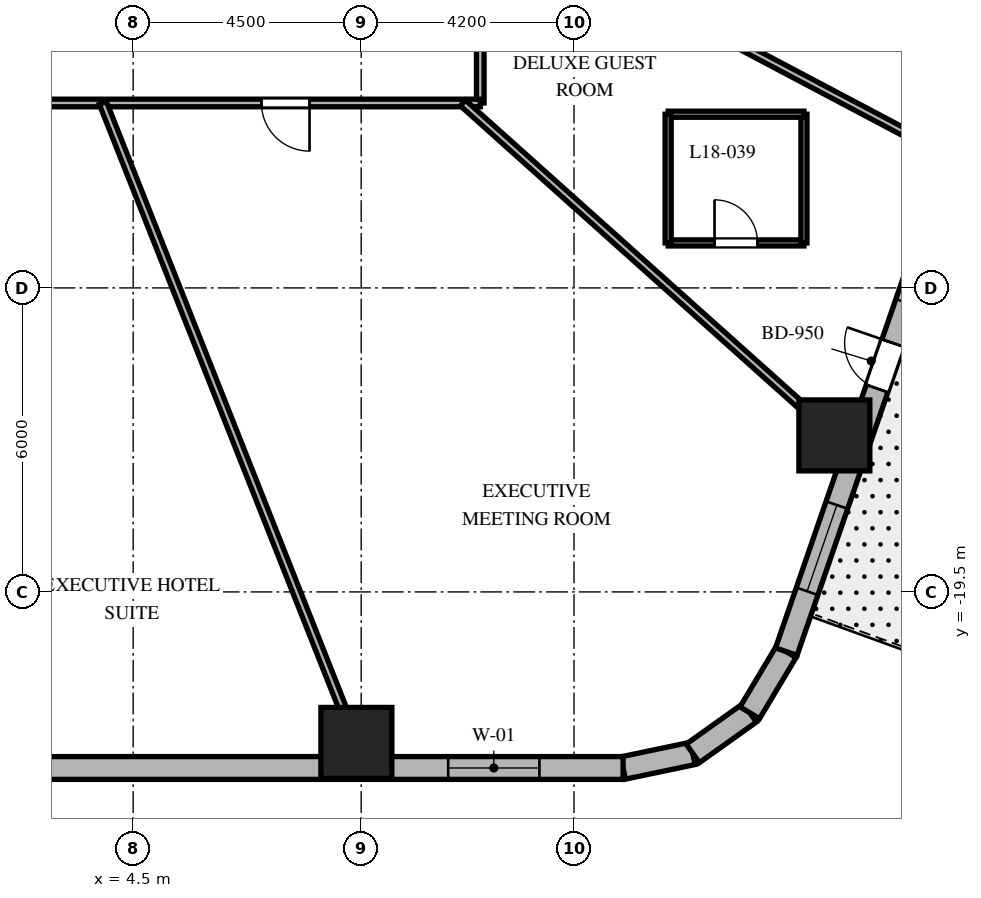
"""IFC4 building model, lengths in metres.
Left out: names, types, materials, properties, quantities, classifications, styles, units other than length and angle.
Written with IfcOpenShell. Run it as: python <this file> out.ifc"""

import sys

from ifc_helpers import new_model, si_unit, direction, frame, frame_2d, origin, origin_2d, place, context, subcontext, project, spatial, rectangle, extrude, element, fill, save


model = new_model("IFC4")
c1 = context("Model", 3, precision=1e-05, world=origin(), true_north=direction((0.0, 1.0)))
c2 = subcontext(c1, "Body", "Model", "MODEL_VIEW")
j1 = project(units=[si_unit("LENGTHUNIT", "METRE"), si_unit("PLANEANGLEUNIT", "RADIAN")], contexts=[c1])
p1 = place(None, origin())
s1 = spatial("IfcSite", under=j1, at=p1, CompositionType="ELEMENT")
p2 = place(p1, origin())
s2 = spatial("IfcBuilding", under=s1, at=p2, CompositionType="ELEMENT")
p3 = place(p2, frame((0.0, 0.0, 78.6)))
s3 = spatial("IfcBuildingStorey", under=s2, at=p3, CompositionType="ELEMENT", Elevation=78.6)
for number, where, z_axis, x_axis in (
    (1, (8.905, -22.48, 0.0), (0.0, 0.0, 1.0), (1.0, 0.0, 0.0)),
    (2, (18.338, -16.411, 0.0), (0.0, 0.0, 1.0), (1.0, 0.0, 0.0)),
):
    element("IfcColumn", number, at=place(p3, frame(where, z_axis=z_axis, x_axis=x_axis)), inside=s3, PredefinedType="COLUMN", context=c2, shape_type="SweptSolid", body=[
        extrude(rectangle(XDim=1.4, YDim=1.4, at=origin_2d()), origin(), (0.0, 0.0, 1.0), 3.7),
    ])
p4 = place(p3, frame((14.168, -22.975, 0.0), z_axis=(0.0, 0.0, 1.0), x_axis=(0.978770371074, 0.204959900243, 0.0)))
e3 = element("IfcWall", 3, at=p4, inside=s3, PredefinedType="SOLIDWALL", context=c2, shape_type="SweptSolid", body=[
    extrude(rectangle(XDim=1.406, YDim=0.45, at=frame_2d((0.703, 0.0))), origin(), (0.0, 0.0, 1.0), 3.4),
])
p5 = place(p3, frame((15.544, -22.687, 0.0), z_axis=(0.0, 0.0, 1.0), x_axis=(0.814210854316, 0.580569276412, 0.0)))
e4 = element("IfcWall", 4, at=p5, inside=s3, PredefinedType="SOLIDWALL", context=c2, shape_type="SweptSolid", body=[
    extrude(rectangle(XDim=1.381, YDim=0.45, at=frame_2d((0.691, 0.0))), origin(), (0.0, 0.0, 1.0), 3.4),
])
p6 = place(p3, frame((16.669, -21.885, 0.0), z_axis=(0.0, 0.0, 1.0), x_axis=(0.512936712947, 0.858426425799, 0.0)))
e5 = element("IfcWall", 5, at=p6, inside=s3, PredefinedType="SOLIDWALL", context=c2, shape_type="SweptSolid", body=[
    extrude(rectangle(XDim=1.406, YDim=0.45, at=frame_2d((0.703, 0.0))), origin(), (0.0, 0.0, 1.0), 3.4),
])
p7 = place(p3, frame((-12.221, -22.975, 0.0), z_axis=(0.0, 0.0, 1.0), x_axis=(1.0, 0.0, 0.0)))
e6 = element("IfcWall", 6, at=p7, inside=s3, PredefinedType="SOLIDWALL", context=c2, shape_type="SweptSolid", body=[
    extrude(rectangle(XDim=26.389, YDim=0.45, at=frame_2d((13.195, 0.0))), origin(), (0.0, 0.0, 1.0), 3.4),
])
p8 = place(p7, frame((1.653, 0.0, 0.8)))
e7 = element("IfcOpeningElement", 7, at=p8, cuts=e6, PredefinedType="OPENING", context=c2, shape_type="SweptSolid", body=[
    extrude(rectangle(XDim=1.8, YDim=1.8, at=frame_2d((0.9, 0.9))), frame((0.0, 0.235, 0.0), z_axis=(0.0, -1.0, 0.0), x_axis=(1.0, 0.0, 0.0)), (0.0, 0.0, 1.0), 0.47),
])
p9 = place(p7, frame((12.296, 0.0, 0.8)))
e8 = element("IfcOpeningElement", 8, at=p9, cuts=e6, PredefinedType="OPENING", context=c2, shape_type="SweptSolid", body=[
    extrude(rectangle(XDim=1.8, YDim=1.8, at=frame_2d((0.9, 0.9))), frame((0.0, 0.235, 0.0), z_axis=(0.0, -1.0, 0.0), x_axis=(1.0, 0.0, 0.0)), (0.0, 0.0, 1.0), 0.47),
])
p10 = place(p7, frame((22.938, 0.0, 0.8)))
e9 = element("IfcOpeningElement", 9, at=p10, cuts=e6, PredefinedType="OPENING", context=c2, shape_type="SweptSolid", body=[
    extrude(rectangle(XDim=1.8, YDim=1.8, at=frame_2d((0.9, 0.9))), frame((0.0, 0.235, 0.0), z_axis=(0.0, -1.0, 0.0), x_axis=(1.0, 0.0, 0.0)), (0.0, 0.0, 1.0), 0.47),
])
p11 = place(p3, frame((17.39, -20.678, 0.0), z_axis=(0.0, 0.0, 1.0), x_axis=(0.326068018294, 0.945346310854, 0.0)))
e10 = element("IfcWall", 10, at=p11, inside=s3, PredefinedType="SOLIDWALL", context=c2, shape_type="SweptSolid", body=[
    extrude(rectangle(XDim=21.793, YDim=0.45, at=frame_2d((10.896, 0.0))), origin(), (0.0, 0.0, 1.0), 3.4),
])
p12 = place(p11, frame((5.493, 0.0, 0.0)))
e11 = element("IfcOpeningElement", 11, at=p12, cuts=e10, PredefinedType="OPENING", context=c2, shape_type="SweptSolid", body=[
    extrude(rectangle(XDim=0.95, YDim=2.15, at=frame_2d((0.475, 1.075))), frame((0.0, 0.235, 0.0), z_axis=(0.0, -1.0, 0.0), x_axis=(1.0, 0.0, 0.0)), (0.0, 0.0, 1.0), 0.47),
])
p13 = place(p11, frame((1.26, 0.0, 0.8)))
e12 = element("IfcOpeningElement", 12, at=p13, cuts=e10, PredefinedType="OPENING", context=c2, shape_type="SweptSolid", body=[
    extrude(rectangle(XDim=1.8, YDim=1.8, at=frame_2d((0.9, 0.9))), frame((0.0, 0.235, 0.0), z_axis=(0.0, -1.0, 0.0), x_axis=(1.0, 0.0, 0.0)), (0.0, 0.0, 1.0), 0.47),
])
p14 = place(p11, frame((7.283, 0.0, 0.8)))
e13 = element("IfcOpeningElement", 13, at=p14, cuts=e10, PredefinedType="OPENING", context=c2, shape_type="SweptSolid", body=[
    extrude(rectangle(XDim=1.8, YDim=1.8, at=frame_2d((0.9, 0.9))), frame((0.0, 0.235, 0.0), z_axis=(0.0, -1.0, 0.0), x_axis=(1.0, 0.0, 0.0)), (0.0, 0.0, 1.0), 0.47),
])
p15 = place(p11, frame((12.736, 0.0, 0.8)))
e14 = element("IfcOpeningElement", 14, at=p15, cuts=e10, PredefinedType="OPENING", context=c2, shape_type="SweptSolid", body=[
    extrude(rectangle(XDim=1.8, YDim=1.8, at=frame_2d((0.9, 0.9))), frame((0.0, 0.235, 0.0), z_axis=(0.0, -1.0, 0.0), x_axis=(1.0, 0.0, 0.0)), (0.0, 0.0, 1.0), 0.47),
])
p16 = place(p11, frame((18.68, 0.0, 0.8)))
e15 = element("IfcOpeningElement", 15, at=p16, cuts=e10, PredefinedType="OPENING", context=c2, shape_type="SweptSolid", body=[
    extrude(rectangle(XDim=1.8, YDim=1.8, at=frame_2d((0.9, 0.9))), frame((0.0, 0.235, 0.0), z_axis=(0.0, -1.0, 0.0), x_axis=(1.0, 0.0, 0.0)), (0.0, 0.0, 1.0), 0.47),
])
p17 = place(p3, frame((11.35, 9.85, 0.0), z_axis=(0.0, 0.0, 1.0), x_axis=(0.0, -1.0, 0.0)))
e16 = element("IfcWall", 16, at=p17, inside=s3, PredefinedType="PARTITIONING", context=c2, shape_type="SweptSolid", body=[
    extrude(rectangle(XDim=19.7, YDim=0.15, at=frame_2d((9.85, 0.0))), origin(), (0.0, 0.0, 1.0), 2.84),
])
p18 = place(p17, frame((4.208, 0.0, 0.0)))
e17 = element("IfcOpeningElement", 17, at=p18, cuts=e16, PredefinedType="OPENING", context=c2, shape_type="SweptSolid", body=[
    extrude(rectangle(XDim=0.95, YDim=2.03, at=frame_2d((0.475, 1.015))), frame((0.0, 0.085, 0.0), z_axis=(0.0, -1.0, 0.0), x_axis=(1.0, 0.0, 0.0)), (0.0, 0.0, 1.0), 0.17),
])
p19 = place(p17, frame((0.97, 0.0, 0.0)))
e18 = element("IfcOpeningElement", 18, at=p19, cuts=e16, PredefinedType="OPENING", context=c2, shape_type="SweptSolid", body=[
    extrude(rectangle(XDim=0.95, YDim=2.03, at=frame_2d((0.475, 1.015))), frame((0.0, 0.085, 0.0), z_axis=(0.0, -1.0, 0.0), x_axis=(1.0, 0.0, 0.0)), (0.0, 0.0, 1.0), 0.17),
])
p20 = place(p17, frame((17.181, 0.0, 0.0)))
e19 = element("IfcOpeningElement", 19, at=p20, cuts=e16, PredefinedType="OPENING", context=c2, shape_type="SweptSolid", body=[
    extrude(rectangle(XDim=0.95, YDim=2.03, at=frame_2d((0.475, 1.015))), frame((0.0, 0.085, 0.0), z_axis=(0.0, -1.0, 0.0), x_axis=(1.0, 0.0, 0.0)), (0.0, 0.0, 1.0), 0.17),
])
p21 = place(p17, frame((13.403, 0.0, 0.0)))
e20 = element("IfcOpeningElement", 20, at=p21, cuts=e16, PredefinedType="OPENING", context=c2, shape_type="SweptSolid", body=[
    extrude(rectangle(XDim=0.95, YDim=2.03, at=frame_2d((0.475, 1.015))), frame((0.0, 0.085, 0.0), z_axis=(0.0, -1.0, 0.0), x_axis=(1.0, 0.0, 0.0)), (0.0, 0.0, 1.0), 0.17),
])
p22 = place(p17, frame((8.838, 0.0, 0.0)))
e21 = element("IfcOpeningElement", 21, at=p22, cuts=e16, PredefinedType="OPENING", context=c2, shape_type="SweptSolid", body=[
    extrude(rectangle(XDim=0.95, YDim=2.03, at=frame_2d((0.475, 1.015))), frame((0.0, 0.085, 0.0), z_axis=(0.0, -1.0, 0.0), x_axis=(1.0, 0.0, 0.0)), (0.0, 0.0, 1.0), 0.17),
])
p23 = place(p3, frame((11.35, -9.85, 0.0), z_axis=(0.0, 0.0, 1.0), x_axis=(-1.0, 0.0, 0.0)))
e22 = element("IfcWall", 22, at=p23, inside=s3, PredefinedType="PARTITIONING", context=c2, shape_type="SweptSolid", body=[
    extrude(rectangle(XDim=22.7, YDim=0.15, at=frame_2d((11.35, 0.0))), origin(), (0.0, 0.0, 1.0), 2.84),
])
p24 = place(p23, frame((18.837, 0.0, 0.0)))
e23 = element("IfcOpeningElement", 23, at=p24, cuts=e22, PredefinedType="OPENING", context=c2, shape_type="SweptSolid", body=[
    extrude(rectangle(XDim=0.9, YDim=2.03, at=frame_2d((0.45, 1.015))), frame((0.0, 0.085, 0.0), z_axis=(0.0, -1.0, 0.0), x_axis=(1.0, 0.0, 0.0)), (0.0, 0.0, 1.0), 0.17),
])
p25 = place(p23, frame((15.532, 0.0, 0.0)))
e24 = element("IfcOpeningElement", 24, at=p25, cuts=e22, PredefinedType="OPENING", context=c2, shape_type="SweptSolid", body=[
    extrude(rectangle(XDim=0.95, YDim=2.03, at=frame_2d((0.475, 1.015))), frame((0.0, 0.085, 0.0), z_axis=(0.0, -1.0, 0.0), x_axis=(1.0, 0.0, 0.0)), (0.0, 0.0, 1.0), 0.17),
])
p26 = place(p23, frame((10.444, 0.0, 0.0)))
e25 = element("IfcOpeningElement", 25, at=p26, cuts=e22, PredefinedType="OPENING", context=c2, shape_type="SweptSolid", body=[
    extrude(rectangle(XDim=0.95, YDim=2.03, at=frame_2d((0.475, 1.015))), frame((0.0, 0.085, 0.0), z_axis=(0.0, -1.0, 0.0), x_axis=(1.0, 0.0, 0.0)), (0.0, 0.0, 1.0), 0.17),
])
p27 = place(p23, frame((3.369, 0.0, 0.0)))
e26 = element("IfcOpeningElement", 26, at=p27, cuts=e22, PredefinedType="OPENING", context=c2, shape_type="SweptSolid", body=[
    extrude(rectangle(XDim=0.95, YDim=2.03, at=frame_2d((0.475, 1.015))), frame((0.0, 0.085, 0.0), z_axis=(0.0, -1.0, 0.0), x_axis=(1.0, 0.0, 0.0)), (0.0, 0.0, 1.0), 0.17),
])
p28 = place(p3, frame((3.902, -9.85, 0.0), z_axis=(0.0, 0.0, 1.0), x_axis=(0.36828765711, -0.929711891728, 0.0)))
e27 = element("IfcWall", 27, at=p28, inside=s3, PredefinedType="PARTITIONING", context=c2, shape_type="SweptSolid", body=[
    extrude(rectangle(XDim=14.117, YDim=0.15, at=frame_2d((7.059, 0.0))), origin(), (0.0, 0.0, 1.0), 2.54),
])
p29 = place(p3, frame((11.007, -9.85, 0.0), z_axis=(0.0, 0.0, 1.0), x_axis=(0.745177305978, -0.666866390407, 0.0)))
e28 = element("IfcWall", 28, at=p29, inside=s3, PredefinedType="PARTITIONING", context=c2, shape_type="SweptSolid", body=[
    extrude(rectangle(XDim=10.375, YDim=0.15, at=frame_2d((5.188, 0.0))), origin(), (0.0, 0.0, 1.0), 2.54),
])
p30 = place(p3, frame((11.35, -6.001, 0.0), z_axis=(0.0, 0.0, 1.0), x_axis=(0.884022077319, -0.467445148453, 0.0)))
e29 = element("IfcWall", 29, at=p30, inside=s3, PredefinedType="PARTITIONING", context=c2, shape_type="SweptSolid", body=[
    extrude(rectangle(XDim=10.621, YDim=0.15, at=frame_2d((5.311, 0.0))), origin(), (0.0, 0.0, 1.0), 2.54),
])
p31 = place(p3, frame((15.058, -12.612, 0.0), z_axis=(0.0, 0.0, 1.0), x_axis=(1.0, 0.0, 0.0)))
e30 = element("IfcWall", 30, at=p31, inside=s3, PredefinedType="PARTITIONING", context=c2, shape_type="SweptSolid", body=[
    extrude(rectangle(XDim=2.68, YDim=0.12, at=frame_2d((1.34, 0.0))), origin(), (0.0, 0.0, 1.0), 2.972),
])
p32 = place(p31, frame((0.915, 0.0, 0.0)))
e31 = element("IfcOpeningElement", 31, at=p32, cuts=e30, PredefinedType="OPENING", context=c2, shape_type="SweptSolid", body=[
    extrude(rectangle(XDim=0.85, YDim=2.03, at=frame_2d((0.425, 1.015))), frame((0.0, 0.07, 0.0), z_axis=(0.0, -1.0, 0.0), x_axis=(1.0, 0.0, 0.0)), (0.0, 0.0, 1.0), 0.14),
])
p33 = place(p3, frame((17.738, -12.612, 0.0), z_axis=(0.0, 0.0, 1.0), x_axis=(0.0, 1.0, 0.0)))
e32 = element("IfcWall", 32, at=p33, inside=s3, PredefinedType="PARTITIONING", context=c2, shape_type="SweptSolid", body=[
    extrude(rectangle(XDim=2.54, YDim=0.12, at=frame_2d((1.27, 0.0))), origin(), (0.0, 0.0, 1.0), 3.4),
])
p34 = place(p3, frame((17.738, -10.072, 0.0), z_axis=(0.0, 0.0, 1.0), x_axis=(-1.0, 0.0, 0.0)))
e33 = element("IfcWall", 33, at=p34, inside=s3, PredefinedType="PARTITIONING", context=c2, shape_type="SweptSolid", body=[
    extrude(rectangle(XDim=2.68, YDim=0.12, at=frame_2d((1.34, 0.0))), origin(), (0.0, 0.0, 1.0), 2.972),
])
p35 = place(p3, frame((15.058, -10.072, 0.0), z_axis=(0.0, 0.0, 1.0), x_axis=(0.0, -1.0, 0.0)))
e34 = element("IfcWall", 34, at=p35, inside=s3, PredefinedType="PARTITIONING", context=c2, shape_type="SweptSolid", body=[
    extrude(rectangle(XDim=2.54, YDim=0.12, at=frame_2d((1.27, 0.0))), origin(), (0.0, 0.0, 1.0), 3.4),
])
p36 = place(p10, origin())
e35 = element("IfcWindow", 35, at=p36, inside=s3, PartitioningType="SINGLE_PANEL", PredefinedType="WINDOW", context=c2, shape_type="SweptSolid", body=[
    extrude(rectangle(XDim=1.8, YDim=1.8, at=frame_2d((0.9, 0.9))), frame((0.0, 0.03, 0.0), z_axis=(0.0, -1.0, 0.0), x_axis=(1.0, 0.0, 0.0)), (0.0, 0.0, 1.0), 0.06),
])
fill(e9, e35)
p37 = place(p12, origin())
e36 = element("IfcDoor", 36, at=p37, inside=s3, OperationType="SINGLE_SWING_RIGHT", PredefinedType="DOOR", context=c2, shape_type="SweptSolid", body=[
    extrude(rectangle(XDim=0.95, YDim=2.15, at=frame_2d((0.475, 1.075))), frame((0.0, 0.025, 0.0), z_axis=(0.0, -1.0, 0.0), x_axis=(1.0, 0.0, 0.0)), (0.0, 0.0, 1.0), 0.05),
])
fill(e11, e36)
p38 = place(p13, origin())
e37 = element("IfcWindow", 37, at=p38, inside=s3, PartitioningType="SINGLE_PANEL", PredefinedType="WINDOW", context=c2, shape_type="SweptSolid", body=[
    extrude(rectangle(XDim=1.8, YDim=1.8, at=frame_2d((0.9, 0.9))), frame((0.0, 0.03, 0.0), z_axis=(0.0, -1.0, 0.0), x_axis=(1.0, 0.0, 0.0)), (0.0, 0.0, 1.0), 0.06),
])
fill(e12, e37)
p39 = place(p27, origin())
e38 = element("IfcDoor", 38, at=p39, inside=s3, OperationType="SINGLE_SWING_LEFT", PredefinedType="DOOR", context=c2, shape_type="SweptSolid", body=[
    extrude(rectangle(XDim=0.95, YDim=2.03, at=frame_2d((0.475, 1.015))), frame((0.0, 0.025, 0.0), z_axis=(0.0, -1.0, 0.0), x_axis=(1.0, 0.0, 0.0)), (0.0, 0.0, 1.0), 0.05),
])
fill(e26, e38)
p40 = place(p32, origin())
e39 = element("IfcDoor", 39, at=p40, inside=s3, OperationType="SINGLE_SWING_LEFT", PredefinedType="DOOR", context=c2, shape_type="SweptSolid", body=[
    extrude(rectangle(XDim=0.85, YDim=2.03, at=frame_2d((0.425, 1.015))), frame((0.0, 0.025, 0.0), z_axis=(0.0, -1.0, 0.0), x_axis=(1.0, 0.0, 0.0)), (0.0, 0.0, 1.0), 0.05),
])
fill(e31, e39)
save(model, sys.argv[1])
